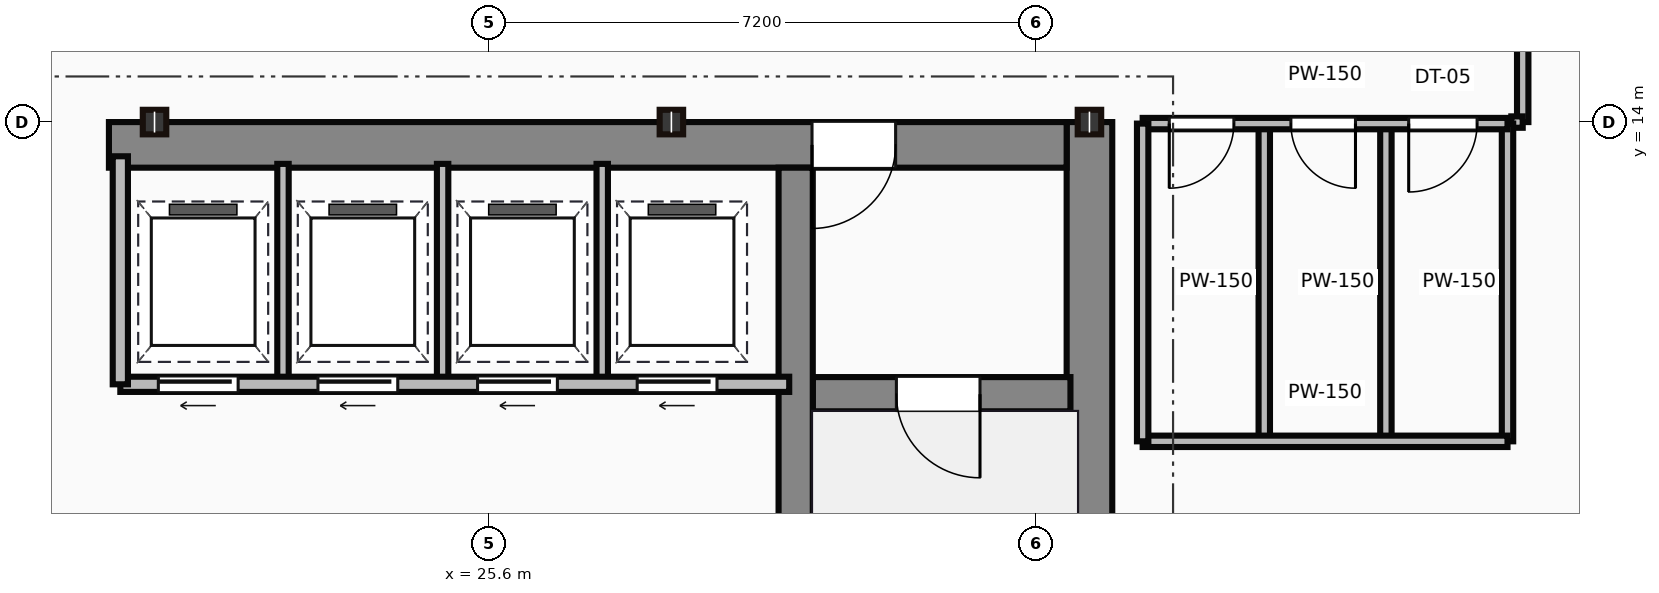
"""IFC4 building model, lengths in metres.
Left out: names, types, materials, properties, quantities, classifications, styles, units other than length and angle.
Written with IfcOpenShell. Run it as: python <this file> out.ifc"""

import sys

from ifc_helpers import new_model, si_unit, direction, frame, frame_2d, origin, origin_2d, place, context, subcontext, project, spatial, rectangle, i_section, extrude, source, transform, mapped, element, fill, save


model = new_model("IFC4")
c1 = context("Model", 3, precision=1e-05, world=origin(), true_north=direction((0.0, 1.0)))
c2 = subcontext(c1, "Body", "Model", "MODEL_VIEW")
j1 = project(units=[si_unit("LENGTHUNIT", "METRE"), si_unit("PLANEANGLEUNIT", "RADIAN")], contexts=[c1])
p1 = place(None, origin())
s1 = spatial("IfcSite", under=j1, at=p1, CompositionType="ELEMENT")
p2 = place(p1, origin())
s2 = spatial("IfcBuilding", under=s1, at=p2, CompositionType="ELEMENT")
p3 = place(p2, frame((0.0, 0.0, 203.2)))
s3 = spatial("IfcBuildingStorey", under=s2, at=p3, CompositionType="ELEMENT", Elevation=203.2)
m1 = source(origin(), c2, "Body", "SweptSolid", [
    extrude(rectangle(XDim=13.1, YDim=0.6, at=frame_2d((6.55, 0.0))), origin(), (0.0, 0.0, 1.0), 3.65),
])
p4 = place(p3, frame((33.5, 0.9, 0.0), z_axis=(0.0, 0.0, 1.0), x_axis=(0.0, 1.0, 0.0)))
e1 = element("IfcWall", 1, at=p4, inside=s3, PredefinedType="SHEAR", context=c2, shape_type="MappedRepresentation", body=[
    mapped(m1, transform((0.0, 0.0, 0.0))),
])
m2 = source(origin(), c2, "Body", "SweptSolid", [
    extrude(rectangle(XDim=12.6, YDim=0.6, at=frame_2d((6.3, 0.0))), origin(), (0.0, 0.0, 1.0), 3.65),
])
p5 = place(p3, frame((20.6, 13.7, 0.0), z_axis=(0.0, 0.0, 1.0), x_axis=(1.0, 0.0, 0.0)))
e2 = element("IfcWall", 2, at=p5, inside=s3, PredefinedType="SHEAR", context=c2, shape_type="MappedRepresentation", body=[
    mapped(m2, transform((0.0, 0.0, 0.0))),
])
p6 = place(p5, frame((9.25, 0.0, 0.0)))
e3 = element("IfcOpeningElement", 3, at=p6, cuts=e2, PredefinedType="OPENING", context=c2, shape_type="SweptSolid", body=[
    extrude(rectangle(XDim=1.1, YDim=2.15, at=frame_2d((0.55, 1.075))), frame((0.0, 0.31, 0.0), z_axis=(0.0, -1.0, 0.0), x_axis=(1.0, 0.0, 0.0)), (0.0, 0.0, 1.0), 0.62),
])
m3 = source(origin(), c2, "Body", "SweptSolid", [
    extrude(rectangle(XDim=12.5, YDim=0.45, at=frame_2d((6.25, 0.0))), origin(), (0.0, 0.0, 1.0), 3.65),
])
p7 = place(p3, frame((29.635, 0.9, 0.0), z_axis=(0.0, 0.0, 1.0), x_axis=(0.0, 1.0, 0.0)))
e4 = element("IfcWall", 4, at=p7, inside=s3, PredefinedType="SHEAR", context=c2, shape_type="MappedRepresentation", body=[
    mapped(m3, transform((0.0, 0.0, 0.0))),
])
m4 = source(origin(), c2, "Body", "SweptSolid", [
    extrude(rectangle(XDim=3.39, YDim=0.45, at=frame_2d((1.695, 0.0))), origin(), (0.0, 0.0, 1.0), 3.65),
])
p8 = place(p3, frame((29.86, 10.42, 0.0), z_axis=(0.0, 0.0, 1.0), x_axis=(1.0, 0.0, 0.0)))
e5 = element("IfcWall", 5, at=p8, inside=s3, PredefinedType="SHEAR", context=c2, shape_type="MappedRepresentation", body=[
    mapped(m4, transform((0.0, 0.0, 0.0))),
])
p9 = place(p8, frame((1.1, 0.0, 0.0)))
e6 = element("IfcOpeningElement", 6, at=p9, cuts=e5, PredefinedType="OPENING", context=c2, shape_type="SweptSolid", body=[
    extrude(rectangle(XDim=1.1, YDim=2.15, at=frame_2d((0.55, 1.075))), frame((0.0, 0.235, 0.0), z_axis=(0.0, -1.0, 0.0), x_axis=(1.0, 0.0, 0.0)), (0.0, 0.0, 1.0), 0.47),
])
m5 = source(origin(), c2, "Body", "SweptSolid", [
    extrude(i_section(OverallWidth=0.309, OverallDepth=0.323, WebThickness=0.014, FlangeThickness=0.023, at=origin_2d()), origin(), (0.0, 0.0, 1.0), 3.65),
])
for number, where, z_axis, x_axis in (
    (7, (21.2, 14.0, 0.0), (0.0, 0.0, 1.0), (1.0, 0.0, 0.0)),
    (8, (28.0, 14.0, 0.0), (0.0, 0.0, 1.0), (1.0, 0.0, 0.0)),
    (9, (33.5, 14.0, 0.0), (0.0, 0.0, 1.0), (1.0, 0.0, 0.0)),
):
    element("IfcColumn", number, at=place(p3, frame(where, z_axis=z_axis, x_axis=x_axis)), inside=s3, PredefinedType="COLUMN", context=c2, shape_type="MappedRepresentation", body=[
        mapped(m5, transform((0.0, 0.0, 0.0))),
    ])
m6 = source(origin(), c2, "Body", "SweptSolid", [
    extrude(rectangle(XDim=8.8, YDim=0.2, at=frame_2d((4.4, 0.0))), origin(), (0.0, 0.0, 1.0), 3.4),
])
p10 = place(p3, frame((20.75, 10.55, 0.0), z_axis=(0.0, 0.0, 1.0), x_axis=(1.0, 0.0, 0.0)))
e10 = element("IfcWall", 10, at=p10, inside=s3, PredefinedType="PARTITIONING", context=c2, shape_type="MappedRepresentation", body=[
    mapped(m6, transform((0.0, 0.0, 0.0))),
])
p11 = place(p10, frame((0.5, 0.0, 0.0)))
e11 = element("IfcOpeningElement", 11, at=p11, cuts=e10, PredefinedType="OPENING", context=c2, shape_type="SweptSolid", body=[
    extrude(rectangle(XDim=1.05, YDim=2.15, at=frame_2d((0.525, 1.075))), frame((0.0, 0.11, 0.0), z_axis=(0.0, -1.0, 0.0), x_axis=(1.0, 0.0, 0.0)), (0.0, 0.0, 1.0), 0.22),
])
p12 = place(p10, frame((2.6, 0.0, 0.0)))
e12 = element("IfcOpeningElement", 12, at=p12, cuts=e10, PredefinedType="OPENING", context=c2, shape_type="SweptSolid", body=[
    extrude(rectangle(XDim=1.05, YDim=2.15, at=frame_2d((0.525, 1.075))), frame((0.0, 0.11, 0.0), z_axis=(0.0, -1.0, 0.0), x_axis=(1.0, 0.0, 0.0)), (0.0, 0.0, 1.0), 0.22),
])
p13 = place(p10, frame((4.7, 0.0, 0.0)))
e13 = element("IfcOpeningElement", 13, at=p13, cuts=e10, PredefinedType="OPENING", context=c2, shape_type="SweptSolid", body=[
    extrude(rectangle(XDim=1.05, YDim=2.15, at=frame_2d((0.525, 1.075))), frame((0.0, 0.11, 0.0), z_axis=(0.0, -1.0, 0.0), x_axis=(1.0, 0.0, 0.0)), (0.0, 0.0, 1.0), 0.22),
])
p14 = place(p10, frame((6.8, 0.0, 0.0)))
e14 = element("IfcOpeningElement", 14, at=p14, cuts=e10, PredefinedType="OPENING", context=c2, shape_type="SweptSolid", body=[
    extrude(rectangle(XDim=1.05, YDim=2.15, at=frame_2d((0.525, 1.075))), frame((0.0, 0.11, 0.0), z_axis=(0.0, -1.0, 0.0), x_axis=(1.0, 0.0, 0.0)), (0.0, 0.0, 1.0), 0.22),
])
m7 = source(origin(), c2, "Body", "SweptSolid", [
    extrude(rectangle(XDim=3.0, YDim=0.2, at=frame_2d((1.5, 0.0))), origin(), (0.0, 0.0, 1.0), 3.4),
])
p15 = place(p3, frame((20.75, 10.55, 0.0), z_axis=(0.0, 0.0, 1.0), x_axis=(0.0, 1.0, 0.0)))
e15 = element("IfcWall", 15, at=p15, inside=s3, PredefinedType="PARTITIONING", context=c2, shape_type="MappedRepresentation", body=[
    mapped(m7, transform((0.0, 0.0, 0.0))),
])
m8 = source(origin(), c2, "Body", "SweptSolid", [
    extrude(rectangle(XDim=2.85, YDim=0.15, at=frame_2d((1.425, 0.0))), origin(), (0.0, 0.0, 1.0), 3.4),
])
for number, where, z_axis, x_axis in (
    (16, (22.89, 10.6, 0.0), (0.0, 0.0, 1.0), (0.0, 1.0, 0.0)),
    (17, (24.99, 10.6, 0.0), (0.0, 0.0, 1.0), (0.0, 1.0, 0.0)),
    (18, (27.09, 10.6, 0.0), (0.0, 0.0, 1.0), (0.0, 1.0, 0.0)),
):
    element("IfcWall", number, at=place(p3, frame(where, z_axis=z_axis, x_axis=x_axis)), inside=s3, PredefinedType="PARTITIONING", context=c2, shape_type="MappedRepresentation", body=[
        mapped(m8, transform((0.0, 0.0, 0.0))),
    ])
m9 = source(origin(), c2, "Body", "SweptSolid", [
    extrude(rectangle(XDim=4.8, YDim=0.15, at=frame_2d((2.4, 0.0))), origin(), (0.0, 0.0, 1.0), 2.787),
])
p16 = place(p3, frame((34.2, 13.98, 0.0), z_axis=(0.0, 0.0, 1.0), x_axis=(1.0, 0.0, 0.0)))
e19 = element("IfcWall", 19, at=p16, inside=s3, PredefinedType="PARTITIONING", context=c2, shape_type="MappedRepresentation", body=[
    mapped(m9, transform((0.0, 0.0, 0.0))),
])
p17 = place(p16, frame((0.35, 0.0, 0.0)))
e20 = element("IfcOpeningElement", 20, at=p17, cuts=e19, PredefinedType="OPENING", context=c2, shape_type="SweptSolid", body=[
    extrude(rectangle(XDim=0.85, YDim=2.1, at=frame_2d((0.425, 1.05))), frame((0.0, 0.085, 0.0), z_axis=(0.0, -1.0, 0.0), x_axis=(1.0, 0.0, 0.0)), (0.0, 0.0, 1.0), 0.17),
])
p18 = place(p16, frame((1.95, 0.0, 0.0)))
e21 = element("IfcOpeningElement", 21, at=p18, cuts=e19, PredefinedType="OPENING", context=c2, shape_type="SweptSolid", body=[
    extrude(rectangle(XDim=0.85, YDim=2.1, at=frame_2d((0.425, 1.05))), frame((0.0, 0.085, 0.0), z_axis=(0.0, -1.0, 0.0), x_axis=(1.0, 0.0, 0.0)), (0.0, 0.0, 1.0), 0.17),
])
p19 = place(p16, frame((3.5, 0.0, 0.0)))
e22 = element("IfcOpeningElement", 22, at=p19, cuts=e19, PredefinedType="OPENING", context=c2, shape_type="SweptSolid", body=[
    extrude(rectangle(XDim=0.9, YDim=2.1, at=frame_2d((0.45, 1.05))), frame((0.0, 0.085, 0.0), z_axis=(0.0, -1.0, 0.0), x_axis=(1.0, 0.0, 0.0)), (0.0, 0.0, 1.0), 0.17),
])
m10 = source(origin(), c2, "Body", "SweptSolid", [
    extrude(rectangle(XDim=4.8, YDim=0.15, at=frame_2d((2.4, 0.0))), origin(), (0.0, 0.0, 1.0), 3.4),
])
p20 = place(p3, frame((34.2, 9.8, 0.0), z_axis=(0.0, 0.0, 1.0), x_axis=(1.0, 0.0, 0.0)))
e23 = element("IfcWall", 23, at=p20, inside=s3, PredefinedType="PARTITIONING", context=c2, shape_type="MappedRepresentation", body=[
    mapped(m10, transform((0.0, 0.0, 0.0))),
])
m11 = source(origin(), c2, "Body", "SweptSolid", [
    extrude(rectangle(XDim=4.18, YDim=0.15, at=frame_2d((2.09, 0.0))), origin(), (0.0, 0.0, 1.0), 3.4),
])
for number, where, z_axis, x_axis in (
    (24, (39.0, 9.8, 0.0), (0.0, 0.0, 1.0), (0.0, 1.0, 0.0)),
    (25, (34.2, 9.8, 0.0), (0.0, 0.0, 1.0), (0.0, 1.0, 0.0)),
    (26, (35.8, 9.8, 0.0), (0.0, 0.0, 1.0), (0.0, 1.0, 0.0)),
    (27, (37.4, 9.8, 0.0), (0.0, 0.0, 1.0), (0.0, 1.0, 0.0)),
):
    element("IfcWall", number, at=place(p3, frame(where, z_axis=z_axis, x_axis=x_axis)), inside=s3, PredefinedType="PARTITIONING", context=c2, shape_type="MappedRepresentation", body=[
        mapped(m11, transform((0.0, 0.0, 0.0))),
    ])
m12 = source(origin(), c2, "Body", "SweptSolid", [
    extrude(rectangle(XDim=2.2, YDim=0.15, at=frame_2d((1.1, 0.0))), origin(), (0.0, 0.0, 1.0), 3.4),
])
p21 = place(p3, frame((39.2, 16.2, 0.0), z_axis=(0.0, 0.0, 1.0), x_axis=(0.0, -1.0, 0.0)))
e28 = element("IfcWall", 28, at=p21, inside=s3, PredefinedType="PARTITIONING", context=c2, shape_type="MappedRepresentation", body=[
    mapped(m12, transform((0.0, 0.0, 0.0))),
])
m13 = source(origin(), c2, "Body", "SweptSolid", [
    extrude(rectangle(XDim=0.15, YDim=0.15, at=frame_2d((0.075, 0.0))), origin(), (0.0, 0.0, 1.0), 3.4),
])
p22 = place(p3, frame((39.2, 14.0, 0.0), z_axis=(0.0, 0.0, 1.0), x_axis=(-1.0, 0.0, 0.0)))
e29 = element("IfcWall", 29, at=p22, inside=s3, PredefinedType="PARTITIONING", context=c2, shape_type="MappedRepresentation", body=[
    mapped(m13, transform((0.0, 0.0, 0.0))),
])
m14 = source(origin(), c2, "Body", "SweptSolid", [
    extrude(rectangle(XDim=1.1, YDim=2.15, at=frame_2d((0.55, 1.075))), frame((0.0, 0.025, 0.0), z_axis=(0.0, -1.0, 0.0), x_axis=(1.0, 0.0, 0.0)), (0.0, 0.0, 1.0), 0.05),
])
p23 = place(p9, frame((1.1, 0.0, 0.0), z_axis=(0.0, 0.0, 1.0), x_axis=(-1.0, 0.0, 0.0)))
e30 = element("IfcDoor", 30, at=p23, inside=s3, OperationType="SINGLE_SWING_RIGHT", PredefinedType="DOOR", context=c2, shape_type="MappedRepresentation", body=[
    mapped(m14, transform((0.0, 0.0, 0.0))),
])
fill(e6, e30)
p24 = place(p6, origin())
e31 = element("IfcDoor", 31, at=p24, inside=s3, OperationType="SINGLE_SWING_LEFT", PredefinedType="DOOR", context=c2, shape_type="MappedRepresentation", body=[
    mapped(m14, transform((0.0, 0.0, 0.0))),
])
fill(e3, e31)
m15 = source(origin(), c2, "Body", "SweptSolid", [
    extrude(rectangle(XDim=1.05, YDim=2.15, at=frame_2d((0.525, 1.075))), frame((0.0, 0.025, 0.0), z_axis=(0.0, -1.0, 0.0), x_axis=(1.0, 0.0, 0.0)), (0.0, 0.0, 1.0), 0.05),
])
p25 = place(p11, frame((1.05, 0.0, 0.0), z_axis=(0.0, 0.0, 1.0), x_axis=(-1.0, 0.0, 0.0)))
e32 = element("IfcDoor", 32, at=p25, inside=s3, OperationType="SLIDING_TO_LEFT", PredefinedType="DOOR", context=c2, shape_type="MappedRepresentation", body=[
    mapped(m15, transform((0.0, 0.0, 0.0))),
])
fill(e11, e32)
p26 = place(p12, frame((1.05, 0.0, 0.0), z_axis=(0.0, 0.0, 1.0), x_axis=(-1.0, 0.0, 0.0)))
e33 = element("IfcDoor", 33, at=p26, inside=s3, OperationType="SLIDING_TO_LEFT", PredefinedType="DOOR", context=c2, shape_type="MappedRepresentation", body=[
    mapped(m15, transform((0.0, 0.0, 0.0))),
])
fill(e12, e33)
p27 = place(p13, frame((1.05, 0.0, 0.0), z_axis=(0.0, 0.0, 1.0), x_axis=(-1.0, 0.0, 0.0)))
e34 = element("IfcDoor", 34, at=p27, inside=s3, OperationType="SLIDING_TO_LEFT", PredefinedType="DOOR", context=c2, shape_type="MappedRepresentation", body=[
    mapped(m15, transform((0.0, 0.0, 0.0))),
])
fill(e13, e34)
p28 = place(p14, frame((1.05, 0.0, 0.0), z_axis=(0.0, 0.0, 1.0), x_axis=(-1.0, 0.0, 0.0)))
e35 = element("IfcDoor", 35, at=p28, inside=s3, OperationType="SLIDING_TO_LEFT", PredefinedType="DOOR", context=c2, shape_type="MappedRepresentation", body=[
    mapped(m15, transform((0.0, 0.0, 0.0))),
])
fill(e14, e35)
m16 = source(origin(), c2, "Body", "SweptSolid", [
    extrude(rectangle(XDim=0.85, YDim=2.1, at=frame_2d((0.425, 1.05))), frame((0.0, 0.025, 0.0), z_axis=(0.0, -1.0, 0.0), x_axis=(1.0, 0.0, 0.0)), (0.0, 0.0, 1.0), 0.05),
])
p29 = place(p17, frame((0.85, 0.0, 0.0), z_axis=(0.0, 0.0, 1.0), x_axis=(-1.0, 0.0, 0.0)))
e36 = element("IfcDoor", 36, at=p29, inside=s3, OperationType="SINGLE_SWING_LEFT", PredefinedType="DOOR", context=c2, shape_type="MappedRepresentation", body=[
    mapped(m16, transform((0.0, 0.0, 0.0))),
])
fill(e20, e36)
p30 = place(p18, frame((0.85, 0.0, 0.0), z_axis=(0.0, 0.0, 1.0), x_axis=(-1.0, 0.0, 0.0)))
e37 = element("IfcDoor", 37, at=p30, inside=s3, OperationType="SINGLE_SWING_RIGHT", PredefinedType="DOOR", context=c2, shape_type="MappedRepresentation", body=[
    mapped(m16, transform((0.0, 0.0, 0.0))),
])
fill(e21, e37)
m17 = source(origin(), c2, "Body", "SweptSolid", [
    extrude(rectangle(XDim=0.9, YDim=2.1, at=frame_2d((0.45, 1.05))), frame((0.0, 0.025, 0.0), z_axis=(0.0, -1.0, 0.0), x_axis=(1.0, 0.0, 0.0)), (0.0, 0.0, 1.0), 0.05),
])
p31 = place(p19, frame((0.9, 0.0, 0.0), z_axis=(0.0, 0.0, 1.0), x_axis=(-1.0, 0.0, 0.0)))
e38 = element("IfcDoor", 38, at=p31, inside=s3, OperationType="SINGLE_SWING_LEFT", PredefinedType="DOOR", context=c2, shape_type="MappedRepresentation", body=[
    mapped(m17, transform((0.0, 0.0, 0.0))),
])
fill(e22, e38)
save(model, sys.argv[1])
